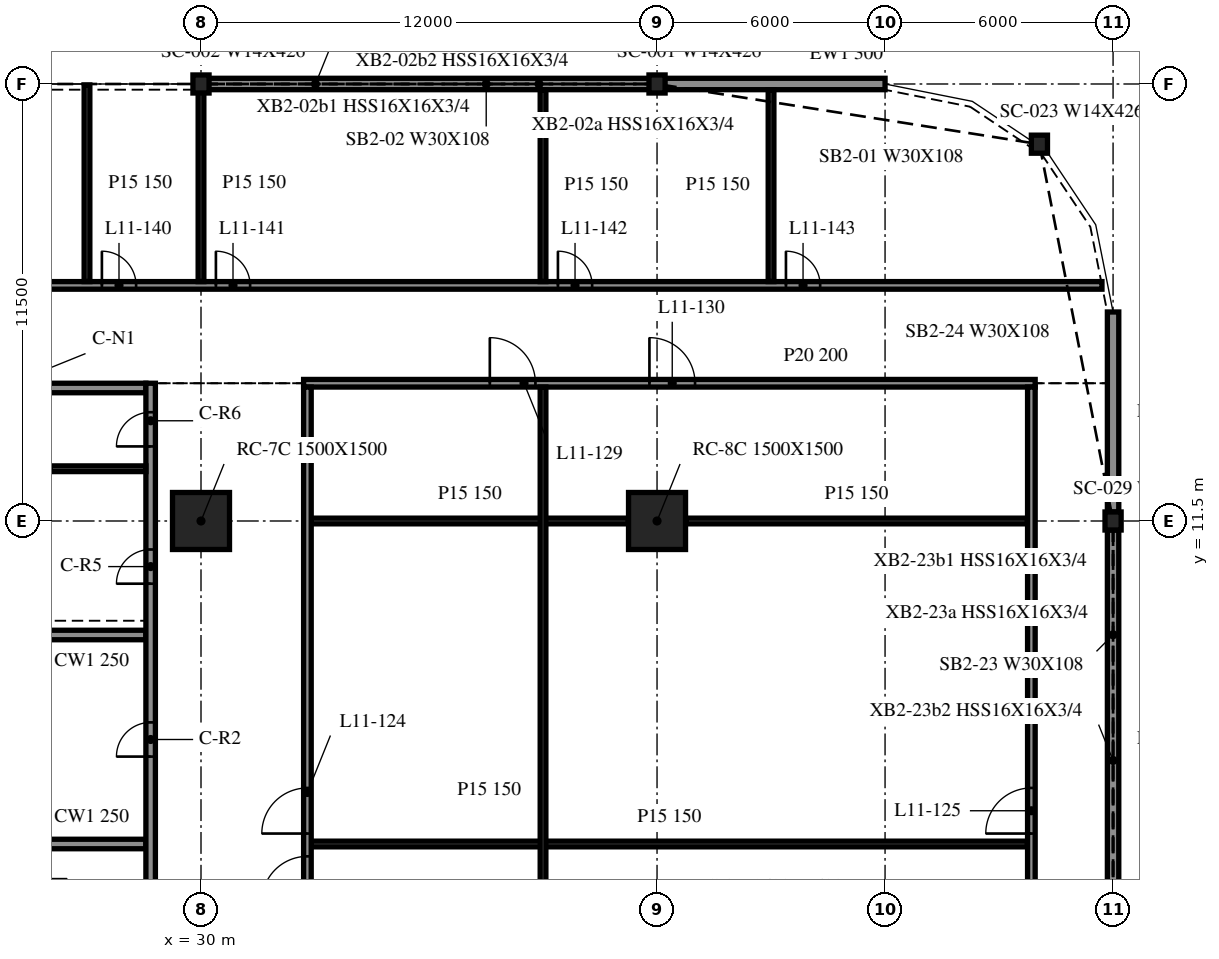
"""IFC4 building model, lengths in metres.
Left out: names, types, materials, properties, quantities, classifications, styles, units other than length and angle.
Written with IfcOpenShell. Run it as: python <this file> out.ifc"""

import sys

from ifc_helpers import new_model, si_unit, direction, frame, frame_2d, origin, origin_2d, place, context, subcontext, project, spatial, rectangle, i_section, extrude, element, fill, save


model = new_model("IFC4")
c1 = context("Model", 3, precision=1e-05, world=origin(), true_north=direction((0.0, 1.0)))
c2 = subcontext(c1, "Body", "Model", "MODEL_VIEW")
j1 = project(units=[si_unit("LENGTHUNIT", "METRE"), si_unit("PLANEANGLEUNIT", "RADIAN")], contexts=[c1])
p1 = place(None, origin())
s1 = spatial("IfcSite", under=j1, at=p1, CompositionType="ELEMENT")
p2 = place(p1, origin())
s2 = spatial("IfcBuilding", under=s1, at=p2, CompositionType="ELEMENT")
p3 = place(p2, frame((0.0, 0.0, 50.3)))
s3 = spatial("IfcBuildingStorey", under=s2, at=p3, CompositionType="ELEMENT", Elevation=50.3)
for number, where, z_axis, x_axis in (
    (1, (30.0, 11.5, -0.34), (0.0, 0.0, 1.0), (1.0, 0.0, 0.0)),
    (2, (42.0, 11.5, -0.34), (0.0, 0.0, 1.0), (1.0, 0.0, 0.0)),
):
    element("IfcColumn", number, at=place(p3, frame(where, z_axis=z_axis, x_axis=x_axis)), inside=s3, PredefinedType="COLUMN", context=c2, shape_type="SweptSolid", body=[
        extrude(rectangle(XDim=1.5, YDim=1.5, at=origin_2d()), origin(), (0.0, 0.0, 1.0), 4.3),
    ])
for number, where, z_axis, x_axis in (
    (3, (52.062, 21.416, -0.34), (0.0, 0.0, 1.0), (1.0, 0.0, 0.0)),
    (4, (42.0, 23.0, -0.34), (0.0, 0.0, 1.0), (1.0, 0.0, 0.0)),
    (5, (30.0, 23.0, -0.34), (0.0, 0.0, 1.0), (1.0, 0.0, 0.0)),
    (6, (54.0, 11.5, -0.34), (0.0, 0.0, 1.0), (1.0, 0.0, 0.0)),
):
    element("IfcColumn", number, at=place(p3, frame(where, z_axis=z_axis, x_axis=x_axis)), inside=s3, PredefinedType="COLUMN", context=c2, shape_type="SweptSolid", body=[
        extrude(i_section(OverallWidth=0.424, OverallDepth=0.475, WebThickness=0.048, FlangeThickness=0.077, at=origin_2d()), origin(), (0.0, 0.0, 1.0), 4.3),
    ])
p4 = place(p3, frame((48.0, 23.0, 0.0), z_axis=(0.0, 0.0, 1.0), x_axis=(-1.0, 0.0, 0.0)))
e7 = element("IfcWall", 7, at=p4, inside=s3, PredefinedType="NOTDEFINED", context=c2, shape_type="SweptSolid", body=[
    extrude(rectangle(XDim=5.976, YDim=0.3, at=frame_2d((2.988, 0.0))), origin(), (0.0, 0.0, 1.0), 3.203),
])
p5 = place(p3, frame((41.976, 23.0, 0.0), z_axis=(0.0, 0.0, 1.0), x_axis=(-1.0, 0.0, 0.0)))
e8 = element("IfcWall", 8, at=p5, inside=s3, PredefinedType="NOTDEFINED", context=c2, shape_type="SweptSolid", body=[
    extrude(rectangle(XDim=11.952, YDim=0.3, at=frame_2d((5.976, 0.0))), origin(), (0.0, 0.0, 1.0), 3.203),
])
p6 = place(p3, frame((54.0, 0.238, 0.0), z_axis=(0.0, 0.0, 1.0), x_axis=(0.0, 1.0, 0.0)))
e9 = element("IfcWall", 9, at=p6, inside=s3, PredefinedType="NOTDEFINED", context=c2, shape_type="SweptSolid", body=[
    extrude(rectangle(XDim=11.024, YDim=0.3, at=frame_2d((5.512, 0.0))), origin(), (0.0, 0.0, 1.0), 3.203),
])
p7 = place(p3, frame((54.0, 11.738, 0.0), z_axis=(0.0, 0.0, 1.0), x_axis=(0.0, 1.0, 0.0)))
e10 = element("IfcWall", 10, at=p7, inside=s3, PredefinedType="NOTDEFINED", context=c2, shape_type="SweptSolid", body=[
    extrude(rectangle(XDim=5.262, YDim=0.3, at=frame_2d((2.631, 0.0))), origin(), (0.0, 0.0, 1.0), 3.203),
])
p8 = place(p3, frame((28.675, -9.125, 0.0), z_axis=(0.0, 0.0, 1.0), x_axis=(0.0, 1.0, 0.0)))
e11 = element("IfcWall", 11, at=p8, inside=s3, PredefinedType="SOLIDWALL", context=c2, shape_type="SweptSolid", body=[
    extrude(rectangle(XDim=24.25, YDim=0.25, at=frame_2d((12.125, 0.0))), origin(), (0.0, 0.0, 1.0), 3.96),
])
p9 = place(p8, frame((14.425, 0.0, 0.0)))
e12 = element("IfcOpeningElement", 12, at=p9, cuts=e11, PredefinedType="OPENING", context=c2, shape_type="SweptSolid", body=[
    extrude(rectangle(XDim=0.9, YDim=2.1, at=frame_2d((0.45, 1.05))), frame((0.0, 0.135, 0.0), z_axis=(0.0, -1.0, 0.0), x_axis=(1.0, 0.0, 0.0)), (0.0, 0.0, 1.0), 0.27),
])
p10 = place(p8, frame((18.975, 0.0, 0.0)))
e13 = element("IfcOpeningElement", 13, at=p10, cuts=e11, PredefinedType="OPENING", context=c2, shape_type="SweptSolid", body=[
    extrude(rectangle(XDim=0.9, YDim=2.1, at=frame_2d((0.45, 1.05))), frame((0.0, 0.135, 0.0), z_axis=(0.0, -1.0, 0.0), x_axis=(1.0, 0.0, 0.0)), (0.0, 0.0, 1.0), 0.27),
])
p11 = place(p8, frame((22.587, 0.0, 0.0)))
e14 = element("IfcOpeningElement", 14, at=p11, cuts=e11, PredefinedType="OPENING", context=c2, shape_type="SweptSolid", body=[
    extrude(rectangle(XDim=0.9, YDim=2.1, at=frame_2d((0.45, 1.05))), frame((0.0, 0.135, 0.0), z_axis=(0.0, -1.0, 0.0), x_axis=(1.0, 0.0, 0.0)), (0.0, 0.0, 1.0), 0.27),
])
p12 = place(p3, frame((19.45, 15.0, 0.0), z_axis=(0.0, 0.0, 1.0), x_axis=(1.0, 0.0, 0.0)))
e15 = element("IfcWall", 15, at=p12, inside=s3, PredefinedType="SOLIDWALL", context=c2, shape_type="SweptSolid", body=[
    extrude(rectangle(XDim=9.1, YDim=0.25, at=frame_2d((4.55, 0.0))), origin(), (0.0, 0.0, 1.0), 3.96),
])
p13 = place(p12, frame((3.65, 0.0, 0.0)))
e16 = element("IfcOpeningElement", 16, at=p13, cuts=e15, PredefinedType="OPENING", context=c2, shape_type="SweptSolid", body=[
    extrude(rectangle(XDim=1.8, YDim=2.1, at=frame_2d((0.9, 1.05))), frame((0.0, 0.135, 0.0), z_axis=(0.0, -1.0, 0.0), x_axis=(1.0, 0.0, 0.0)), (0.0, 0.0, 1.0), 0.27),
])
for number, where, z_axis, x_axis in (
    (17, (25.7, 3.0, 0.0), (0.0, 0.0, 1.0), (1.0, 0.0, 0.0)),
    (18, (25.7, 8.5, 0.0), (0.0, 0.0, 1.0), (1.0, 0.0, 0.0)),
):
    element("IfcWall", number, at=place(p3, frame(where, z_axis=z_axis, x_axis=x_axis)), inside=s3, PredefinedType="SOLIDWALL", context=c2, shape_type="SweptSolid", body=[
        extrude(rectangle(XDim=2.85, YDim=0.25, at=frame_2d((1.425, 0.0))), origin(), (0.0, 0.0, 1.0), 3.96),
    ])
p14 = place(p3, frame((25.7, 12.875, 0.0), z_axis=(0.0, 0.0, 1.0), x_axis=(1.0, 0.0, 0.0)))
e19 = element("IfcWall", 19, at=p14, inside=s3, PredefinedType="PARTITIONING", context=c2, shape_type="SweptSolid", body=[
    extrude(rectangle(XDim=2.85, YDim=0.15, at=frame_2d((1.425, 0.0))), origin(), (0.0, 0.0, 1.0), 3.96),
])
p15 = place(p3, frame((32.9, 3.0, 0.0), z_axis=(0.0, 0.0, 1.0), x_axis=(1.0, 0.0, 0.0)))
e20 = element("IfcWall", 20, at=p15, inside=s3, PredefinedType="PARTITIONING", context=c2, shape_type="SweptSolid", body=[
    extrude(rectangle(XDim=18.85, YDim=0.15, at=frame_2d((9.425, 0.0))), origin(), (0.0, 0.0, 1.0), 3.96),
])
p16 = place(p3, frame((32.9, 11.5, 0.0), z_axis=(0.0, 0.0, 1.0), x_axis=(1.0, 0.0, 0.0)))
e21 = element("IfcWall", 21, at=p16, inside=s3, PredefinedType="PARTITIONING", context=c2, shape_type="SweptSolid", body=[
    extrude(rectangle(XDim=8.35, YDim=0.15, at=frame_2d((4.175, 0.0))), origin(), (0.0, 0.0, 1.0), 3.96),
])
p17 = place(p3, frame((42.75, 11.5, 0.0), z_axis=(0.0, 0.0, 1.0), x_axis=(1.0, 0.0, 0.0)))
e22 = element("IfcWall", 22, at=p17, inside=s3, PredefinedType="PARTITIONING", context=c2, shape_type="SweptSolid", body=[
    extrude(rectangle(XDim=9.0, YDim=0.15, at=frame_2d((4.5, 0.0))), origin(), (0.0, 0.0, 1.0), 3.96),
])
p18 = place(p3, frame((32.7, 15.125, 0.0), z_axis=(0.0, 0.0, 1.0), x_axis=(1.0, 0.0, 0.0)))
e23 = element("IfcWall", 23, at=p18, inside=s3, PredefinedType="PARTITIONING", context=c2, shape_type="SweptSolid", body=[
    extrude(rectangle(XDim=19.25, YDim=0.2, at=frame_2d((9.625, 0.0))), origin(), (0.0, 0.0, 1.0), 3.96),
])
p19 = place(p18, frame((4.9, 0.0, 0.0)))
e24 = element("IfcOpeningElement", 24, at=p19, cuts=e23, PredefinedType="OPENING", context=c2, shape_type="SweptSolid", body=[
    extrude(rectangle(XDim=1.2, YDim=2.1, at=frame_2d((0.6, 1.05))), frame((0.0, 0.11, 0.0), z_axis=(0.0, -1.0, 0.0), x_axis=(1.0, 0.0, 0.0)), (0.0, 0.0, 1.0), 0.22),
])
p20 = place(p18, frame((9.1, 0.0, 0.0)))
e25 = element("IfcOpeningElement", 25, at=p20, cuts=e23, PredefinedType="OPENING", context=c2, shape_type="SweptSolid", body=[
    extrude(rectangle(XDim=1.2, YDim=2.1, at=frame_2d((0.6, 1.05))), frame((0.0, 0.11, 0.0), z_axis=(0.0, -1.0, 0.0), x_axis=(1.0, 0.0, 0.0)), (0.0, 0.0, 1.0), 0.22),
])
p21 = place(p3, frame((-41.708, 17.7, 0.0), z_axis=(0.0, 0.0, 1.0), x_axis=(1.0, 0.0, 0.0)))
e26 = element("IfcWall", 26, at=p21, inside=s3, PredefinedType="PARTITIONING", context=c2, shape_type="SweptSolid", body=[
    extrude(rectangle(XDim=95.416, YDim=0.2, at=frame_2d((47.708, 0.0))), origin(), (0.0, 0.0, 1.0), 3.96),
])
p22 = place(p21, frame((7.5, 0.0, 0.0)))
e27 = element("IfcOpeningElement", 27, at=p22, cuts=e26, PredefinedType="OPENING", context=c2, shape_type="SweptSolid", body=[
    extrude(rectangle(XDim=0.9, YDim=2.1, at=frame_2d((0.45, 1.05))), frame((0.0, 0.11, 0.0), z_axis=(0.0, -1.0, 0.0), x_axis=(1.0, 0.0, 0.0)), (0.0, 0.0, 1.0), 0.22),
])
p23 = place(p21, frame((13.5, 0.0, 0.0)))
e28 = element("IfcOpeningElement", 28, at=p23, cuts=e26, PredefinedType="OPENING", context=c2, shape_type="SweptSolid", body=[
    extrude(rectangle(XDim=0.9, YDim=2.1, at=frame_2d((0.45, 1.05))), frame((0.0, 0.11, 0.0), z_axis=(0.0, -1.0, 0.0), x_axis=(1.0, 0.0, 0.0)), (0.0, 0.0, 1.0), 0.22),
])
p24 = place(p21, frame((19.5, 0.0, 0.0)))
e29 = element("IfcOpeningElement", 29, at=p24, cuts=e26, PredefinedType="OPENING", context=c2, shape_type="SweptSolid", body=[
    extrude(rectangle(XDim=0.9, YDim=2.1, at=frame_2d((0.45, 1.05))), frame((0.0, 0.11, 0.0), z_axis=(0.0, -1.0, 0.0), x_axis=(1.0, 0.0, 0.0)), (0.0, 0.0, 1.0), 0.22),
])
p25 = place(p21, frame((31.5, 0.0, 0.0)))
e30 = element("IfcOpeningElement", 30, at=p25, cuts=e26, PredefinedType="OPENING", context=c2, shape_type="SweptSolid", body=[
    extrude(rectangle(XDim=0.9, YDim=2.1, at=frame_2d((0.45, 1.05))), frame((0.0, 0.11, 0.0), z_axis=(0.0, -1.0, 0.0), x_axis=(1.0, 0.0, 0.0)), (0.0, 0.0, 1.0), 0.22),
])
p26 = place(p21, frame((34.5, 0.0, 0.0)))
e31 = element("IfcOpeningElement", 31, at=p26, cuts=e26, PredefinedType="OPENING", context=c2, shape_type="SweptSolid", body=[
    extrude(rectangle(XDim=0.9, YDim=2.1, at=frame_2d((0.45, 1.05))), frame((0.0, 0.11, 0.0), z_axis=(0.0, -1.0, 0.0), x_axis=(1.0, 0.0, 0.0)), (0.0, 0.0, 1.0), 0.22),
])
p27 = place(p21, frame((43.5, 0.0, 0.0)))
e32 = element("IfcOpeningElement", 32, at=p27, cuts=e26, PredefinedType="OPENING", context=c2, shape_type="SweptSolid", body=[
    extrude(rectangle(XDim=0.9, YDim=2.1, at=frame_2d((0.45, 1.05))), frame((0.0, 0.11, 0.0), z_axis=(0.0, -1.0, 0.0), x_axis=(1.0, 0.0, 0.0)), (0.0, 0.0, 1.0), 0.22),
])
p28 = place(p21, frame((47.3, 0.0, 0.0)))
e33 = element("IfcOpeningElement", 33, at=p28, cuts=e26, PredefinedType="OPENING", context=c2, shape_type="SweptSolid", body=[
    extrude(rectangle(XDim=0.9, YDim=2.1, at=frame_2d((0.45, 1.05))), frame((0.0, 0.11, 0.0), z_axis=(0.0, -1.0, 0.0), x_axis=(1.0, 0.0, 0.0)), (0.0, 0.0, 1.0), 0.22),
])
p29 = place(p21, frame((51.1, 0.0, 0.0)))
e34 = element("IfcOpeningElement", 34, at=p29, cuts=e26, PredefinedType="OPENING", context=c2, shape_type="SweptSolid", body=[
    extrude(rectangle(XDim=0.9, YDim=2.1, at=frame_2d((0.45, 1.05))), frame((0.0, 0.11, 0.0), z_axis=(0.0, -1.0, 0.0), x_axis=(1.0, 0.0, 0.0)), (0.0, 0.0, 1.0), 0.22),
])
p30 = place(p21, frame((57.1, 0.0, 0.0)))
e35 = element("IfcOpeningElement", 35, at=p30, cuts=e26, PredefinedType="OPENING", context=c2, shape_type="SweptSolid", body=[
    extrude(rectangle(XDim=0.9, YDim=2.1, at=frame_2d((0.45, 1.05))), frame((0.0, 0.11, 0.0), z_axis=(0.0, -1.0, 0.0), x_axis=(1.0, 0.0, 0.0)), (0.0, 0.0, 1.0), 0.22),
])
p31 = place(p21, frame((69.1, 0.0, 0.0)))
e36 = element("IfcOpeningElement", 36, at=p31, cuts=e26, PredefinedType="OPENING", context=c2, shape_type="SweptSolid", body=[
    extrude(rectangle(XDim=0.9, YDim=2.1, at=frame_2d((0.45, 1.05))), frame((0.0, 0.11, 0.0), z_axis=(0.0, -1.0, 0.0), x_axis=(1.0, 0.0, 0.0)), (0.0, 0.0, 1.0), 0.22),
])
p32 = place(p21, frame((72.1, 0.0, 0.0)))
e37 = element("IfcOpeningElement", 37, at=p32, cuts=e26, PredefinedType="OPENING", context=c2, shape_type="SweptSolid", body=[
    extrude(rectangle(XDim=0.9, YDim=2.1, at=frame_2d((0.45, 1.05))), frame((0.0, 0.11, 0.0), z_axis=(0.0, -1.0, 0.0), x_axis=(1.0, 0.0, 0.0)), (0.0, 0.0, 1.0), 0.22),
])
p33 = place(p21, frame((81.1, 0.0, 0.0)))
e38 = element("IfcOpeningElement", 38, at=p33, cuts=e26, PredefinedType="OPENING", context=c2, shape_type="SweptSolid", body=[
    extrude(rectangle(XDim=0.9, YDim=2.1, at=frame_2d((0.45, 1.05))), frame((0.0, 0.11, 0.0), z_axis=(0.0, -1.0, 0.0), x_axis=(1.0, 0.0, 0.0)), (0.0, 0.0, 1.0), 0.22),
])
p34 = place(p21, frame((87.1, 0.0, 0.0)))
e39 = element("IfcOpeningElement", 39, at=p34, cuts=e26, PredefinedType="OPENING", context=c2, shape_type="SweptSolid", body=[
    extrude(rectangle(XDim=0.9, YDim=2.1, at=frame_2d((0.45, 1.05))), frame((0.0, 0.11, 0.0), z_axis=(0.0, -1.0, 0.0), x_axis=(1.0, 0.0, 0.0)), (0.0, 0.0, 1.0), 0.22),
])
for number, where, z_axis, x_axis in (
    (40, (27.0, 17.8, 0.0), (0.0, 0.0, 1.0), (0.0, 1.0, 0.0)),
    (41, (30.0, 17.8, 0.0), (0.0, 0.0, 1.0), (0.0, 1.0, 0.0)),
):
    element("IfcWall", number, at=place(p3, frame(where, z_axis=z_axis, x_axis=x_axis)), inside=s3, PredefinedType="PARTITIONING", context=c2, shape_type="SweptSolid", body=[
        extrude(rectangle(XDim=5.175, YDim=0.15, at=frame_2d((2.587, 0.0))), origin(), (0.0, 0.0, 1.0), 3.96),
    ])
p35 = place(p3, frame((32.8, -9.025, 0.0), z_axis=(0.0, 0.0, 1.0), x_axis=(0.0, 1.0, 0.0)))
e42 = element("IfcWall", 42, at=p35, inside=s3, PredefinedType="PARTITIONING", context=c2, shape_type="SweptSolid", body=[
    extrude(rectangle(XDim=24.05, YDim=0.2, at=frame_2d((12.025, 0.0))), origin(), (0.0, 0.0, 1.0), 3.96),
])
p36 = place(p35, frame((10.5, 0.0, 0.0)))
e43 = element("IfcOpeningElement", 43, at=p36, cuts=e42, PredefinedType="OPENING", context=c2, shape_type="SweptSolid", body=[
    extrude(rectangle(XDim=1.2, YDim=2.1, at=frame_2d((0.6, 1.05))), frame((0.0, 0.11, 0.0), z_axis=(0.0, -1.0, 0.0), x_axis=(1.0, 0.0, 0.0)), (0.0, 0.0, 1.0), 0.22),
])
p37 = place(p35, frame((12.3, 0.0, 0.0)))
e44 = element("IfcOpeningElement", 44, at=p37, cuts=e42, PredefinedType="OPENING", context=c2, shape_type="SweptSolid", body=[
    extrude(rectangle(XDim=1.2, YDim=2.1, at=frame_2d((0.6, 1.05))), frame((0.0, 0.11, 0.0), z_axis=(0.0, -1.0, 0.0), x_axis=(1.0, 0.0, 0.0)), (0.0, 0.0, 1.0), 0.22),
])
p38 = place(p3, frame((39.0, -9.025, 0.0), z_axis=(0.0, 0.0, 1.0), x_axis=(0.0, 1.0, 0.0)))
e45 = element("IfcWall", 45, at=p38, inside=s3, PredefinedType="PARTITIONING", context=c2, shape_type="SweptSolid", body=[
    extrude(rectangle(XDim=24.05, YDim=0.15, at=frame_2d((12.025, 0.0))), origin(), (0.0, 0.0, 1.0), 3.96),
])
for number, where, z_axis, x_axis in (
    (46, (39.0, 17.8, 0.0), (0.0, 0.0, 1.0), (0.0, 1.0, 0.0)),
    (47, (45.0, 17.8, 0.0), (0.0, 0.0, 1.0), (0.0, 1.0, 0.0)),
):
    element("IfcWall", number, at=place(p3, frame(where, z_axis=z_axis, x_axis=x_axis)), inside=s3, PredefinedType="PARTITIONING", context=c2, shape_type="SweptSolid", body=[
        extrude(rectangle(XDim=5.05, YDim=0.15, at=frame_2d((2.525, 0.0))), origin(), (0.0, 0.0, 1.0), 3.96),
    ])
p39 = place(p3, frame((51.85, -9.025, 0.0), z_axis=(0.0, 0.0, 1.0), x_axis=(0.0, 1.0, 0.0)))
e48 = element("IfcWall", 48, at=p39, inside=s3, PredefinedType="PARTITIONING", context=c2, shape_type="SweptSolid", body=[
    extrude(rectangle(XDim=24.05, YDim=0.2, at=frame_2d((12.025, 0.0))), origin(), (0.0, 0.0, 1.0), 3.96),
])
p40 = place(p39, frame((12.3, 0.0, 0.0)))
e49 = element("IfcOpeningElement", 49, at=p40, cuts=e48, PredefinedType="OPENING", context=c2, shape_type="SweptSolid", body=[
    extrude(rectangle(XDim=1.2, YDim=2.1, at=frame_2d((0.6, 1.05))), frame((0.0, 0.11, 0.0), z_axis=(0.0, -1.0, 0.0), x_axis=(1.0, 0.0, 0.0)), (0.0, 0.0, 1.0), 0.22),
])
p41 = place(p9, origin())
e50 = element("IfcDoor", 50, at=p41, inside=s3, OperationType="SINGLE_SWING_RIGHT", PredefinedType="DOOR", context=c2, shape_type="SweptSolid", body=[
    extrude(rectangle(XDim=0.9, YDim=2.1, at=frame_2d((0.45, 1.05))), frame((0.0, 0.025, 0.0), z_axis=(0.0, -1.0, 0.0), x_axis=(1.0, 0.0, 0.0)), (0.0, 0.0, 1.0), 0.05),
])
fill(e12, e50)
p42 = place(p10, origin())
e51 = element("IfcDoor", 51, at=p42, inside=s3, OperationType="SINGLE_SWING_LEFT", PredefinedType="DOOR", context=c2, shape_type="SweptSolid", body=[
    extrude(rectangle(XDim=0.9, YDim=2.1, at=frame_2d((0.45, 1.05))), frame((0.0, 0.025, 0.0), z_axis=(0.0, -1.0, 0.0), x_axis=(1.0, 0.0, 0.0)), (0.0, 0.0, 1.0), 0.05),
])
fill(e13, e51)
p43 = place(p11, origin())
e52 = element("IfcDoor", 52, at=p43, inside=s3, OperationType="SINGLE_SWING_RIGHT", PredefinedType="DOOR", context=c2, shape_type="SweptSolid", body=[
    extrude(rectangle(XDim=0.9, YDim=2.1, at=frame_2d((0.45, 1.05))), frame((0.0, 0.025, 0.0), z_axis=(0.0, -1.0, 0.0), x_axis=(1.0, 0.0, 0.0)), (0.0, 0.0, 1.0), 0.05),
])
fill(e14, e52)
p44 = place(p36, origin())
e53 = element("IfcDoor", 53, at=p44, inside=s3, OperationType="SINGLE_SWING_RIGHT", PredefinedType="DOOR", context=c2, shape_type="SweptSolid", body=[
    extrude(rectangle(XDim=1.2, YDim=2.1, at=frame_2d((0.6, 1.05))), frame((0.0, 0.025, 0.0), z_axis=(0.0, -1.0, 0.0), x_axis=(1.0, 0.0, 0.0)), (0.0, 0.0, 1.0), 0.05),
])
fill(e43, e53)
p45 = place(p37, origin())
e54 = element("IfcDoor", 54, at=p45, inside=s3, OperationType="SINGLE_SWING_LEFT", PredefinedType="DOOR", context=c2, shape_type="SweptSolid", body=[
    extrude(rectangle(XDim=1.2, YDim=2.1, at=frame_2d((0.6, 1.05))), frame((0.0, 0.025, 0.0), z_axis=(0.0, -1.0, 0.0), x_axis=(1.0, 0.0, 0.0)), (0.0, 0.0, 1.0), 0.05),
])
fill(e44, e54)
p46 = place(p40, origin())
e55 = element("IfcDoor", 55, at=p46, inside=s3, OperationType="SINGLE_SWING_RIGHT", PredefinedType="DOOR", context=c2, shape_type="SweptSolid", body=[
    extrude(rectangle(XDim=1.2, YDim=2.1, at=frame_2d((0.6, 1.05))), frame((0.0, 0.025, 0.0), z_axis=(0.0, -1.0, 0.0), x_axis=(1.0, 0.0, 0.0)), (0.0, 0.0, 1.0), 0.05),
])
fill(e49, e55)
p47 = place(p19, origin())
e56 = element("IfcDoor", 56, at=p47, inside=s3, OperationType="SINGLE_SWING_RIGHT", PredefinedType="DOOR", context=c2, shape_type="SweptSolid", body=[
    extrude(rectangle(XDim=1.2, YDim=2.1, at=frame_2d((0.6, 1.05))), frame((0.0, 0.025, 0.0), z_axis=(0.0, -1.0, 0.0), x_axis=(1.0, 0.0, 0.0)), (0.0, 0.0, 1.0), 0.05),
])
fill(e24, e56)
p48 = place(p20, origin())
e57 = element("IfcDoor", 57, at=p48, inside=s3, OperationType="SINGLE_SWING_LEFT", PredefinedType="DOOR", context=c2, shape_type="SweptSolid", body=[
    extrude(rectangle(XDim=1.2, YDim=2.1, at=frame_2d((0.6, 1.05))), frame((0.0, 0.025, 0.0), z_axis=(0.0, -1.0, 0.0), x_axis=(1.0, 0.0, 0.0)), (0.0, 0.0, 1.0), 0.05),
])
fill(e25, e57)
p49 = place(p31, origin())
e58 = element("IfcDoor", 58, at=p49, inside=s3, OperationType="SINGLE_SWING_RIGHT", PredefinedType="DOOR", context=c2, shape_type="SweptSolid", body=[
    extrude(rectangle(XDim=0.9, YDim=2.1, at=frame_2d((0.45, 1.05))), frame((0.0, 0.025, 0.0), z_axis=(0.0, -1.0, 0.0), x_axis=(1.0, 0.0, 0.0)), (0.0, 0.0, 1.0), 0.05),
])
fill(e36, e58)
p50 = place(p32, origin())
e59 = element("IfcDoor", 59, at=p50, inside=s3, OperationType="SINGLE_SWING_RIGHT", PredefinedType="DOOR", context=c2, shape_type="SweptSolid", body=[
    extrude(rectangle(XDim=0.9, YDim=2.1, at=frame_2d((0.45, 1.05))), frame((0.0, 0.025, 0.0), z_axis=(0.0, -1.0, 0.0), x_axis=(1.0, 0.0, 0.0)), (0.0, 0.0, 1.0), 0.05),
])
fill(e37, e59)
p51 = place(p33, origin())
e60 = element("IfcDoor", 60, at=p51, inside=s3, OperationType="SINGLE_SWING_RIGHT", PredefinedType="DOOR", context=c2, shape_type="SweptSolid", body=[
    extrude(rectangle(XDim=0.9, YDim=2.1, at=frame_2d((0.45, 1.05))), frame((0.0, 0.025, 0.0), z_axis=(0.0, -1.0, 0.0), x_axis=(1.0, 0.0, 0.0)), (0.0, 0.0, 1.0), 0.05),
])
fill(e38, e60)
p52 = place(p34, origin())
e61 = element("IfcDoor", 61, at=p52, inside=s3, OperationType="SINGLE_SWING_RIGHT", PredefinedType="DOOR", context=c2, shape_type="SweptSolid", body=[
    extrude(rectangle(XDim=0.9, YDim=2.1, at=frame_2d((0.45, 1.05))), frame((0.0, 0.025, 0.0), z_axis=(0.0, -1.0, 0.0), x_axis=(1.0, 0.0, 0.0)), (0.0, 0.0, 1.0), 0.05),
])
fill(e39, e61)
save(model, sys.argv[1])
